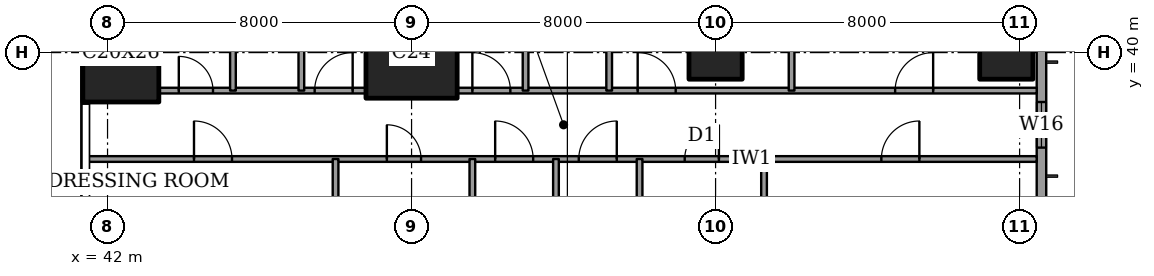
"""IFC4 building model, lengths in metres.
Left out: names, types, materials, properties, quantities, classifications, styles, units other than length and angle.
Written with IfcOpenShell. Run it as: python <this file> out.ifc"""

import sys

from ifc_helpers import new_model, si_unit, direction, frame, frame_2d, origin, origin_2d, place, context, subcontext, project, spatial, rectangle, extrude, element, fill, save


model = new_model("IFC4")
c1 = context("Model", 3, precision=1e-05, world=origin(), true_north=direction((0.0, 1.0)))
c2 = subcontext(c1, "Body", "Model", "MODEL_VIEW")
j1 = project(units=[si_unit("LENGTHUNIT", "METRE"), si_unit("PLANEANGLEUNIT", "RADIAN")], contexts=[c1])
p1 = place(None, origin())
s1 = spatial("IfcSite", under=j1, at=p1, CompositionType="ELEMENT")
p2 = place(p1, origin())
s2 = spatial("IfcBuilding", under=s1, at=p2, CompositionType="ELEMENT")
p3 = place(p2, frame((0.0, 0.0, 282.6)))
s3 = spatial("IfcBuildingStorey", under=s2, at=p3, CompositionType="ELEMENT", Elevation=282.6)
p4 = place(p3, frame((42.35, 40.0, 0.0), z_axis=(0.0, 0.0, 1.0), x_axis=(1.0, 0.0, 0.0)))
e1 = element("IfcColumn", 1, at=p4, inside=s3, PredefinedType="COLUMN", context=c2, shape_type="SweptSolid", body=[
    extrude(rectangle(XDim=2.0, YDim=2.6, at=origin_2d()), origin(), (0.0, 0.0, 1.0), 4.5),
])
p5 = place(p3, frame((50.0, 40.0, 0.0), z_axis=(0.0, 0.0, 1.0), x_axis=(1.0, 0.0, 0.0)))
e2 = element("IfcColumn", 2, at=p5, inside=s3, PredefinedType="COLUMN", context=c2, shape_type="SweptSolid", body=[
    extrude(rectangle(XDim=2.4, YDim=2.4, at=origin_2d()), origin(), (0.0, 0.0, 1.0), 4.5),
])
for number, where, z_axis, x_axis in (
    (3, (58.0, 40.0, 0.0), (0.0, 0.0, 1.0), (1.0, 0.0, 0.0)),
    (4, (65.65, 40.0, 0.0), (0.0, 0.0, 1.0), (1.0, 0.0, 0.0)),
):
    element("IfcColumn", number, at=place(p3, frame(where, z_axis=z_axis, x_axis=x_axis)), inside=s3, PredefinedType="COLUMN", context=c2, shape_type="SweptSolid", body=[
        extrude(rectangle(XDim=1.4, YDim=1.4, at=origin_2d()), origin(), (0.0, 0.0, 1.0), 4.5),
    ])
p6 = place(p3, frame((66.575, 3.175, 0.0), z_axis=(0.0, 0.0, 1.0), x_axis=(0.0, 1.0, 0.0)))
e5 = element("IfcWall", 5, at=p6, inside=s3, PredefinedType="SOLIDWALL", context=c2, shape_type="SweptSolid", body=[
    extrude(rectangle(XDim=41.65, YDim=0.25, at=frame_2d((20.825, 0.0))), origin(), (0.0, 0.0, 1.0), 4.5),
])
p7 = place(p6, frame((1.775, 0.0, 0.6)))
e6 = element("IfcOpeningElement", 6, at=p7, cuts=e5, PredefinedType="OPENING", context=c2, shape_type="SweptSolid", body=[
    extrude(rectangle(XDim=2.4, YDim=2.8, at=frame_2d((1.2, 1.4))), frame((0.0, 0.135, 0.0), z_axis=(0.0, -1.0, 0.0), x_axis=(1.0, 0.0, 0.0)), (0.0, 0.0, 1.0), 0.27),
])
p8 = place(p6, frame((6.225, 0.0, 0.6)))
e7 = element("IfcOpeningElement", 7, at=p8, cuts=e5, PredefinedType="OPENING", context=c2, shape_type="SweptSolid", body=[
    extrude(rectangle(XDim=1.2, YDim=2.8, at=frame_2d((0.6, 1.4))), frame((0.0, 0.135, 0.0), z_axis=(0.0, -1.0, 0.0), x_axis=(1.0, 0.0, 0.0)), (0.0, 0.0, 1.0), 0.27),
])
p9 = place(p6, frame((9.625, 0.0, 0.6)))
e8 = element("IfcOpeningElement", 8, at=p9, cuts=e5, PredefinedType="OPENING", context=c2, shape_type="SweptSolid", body=[
    extrude(rectangle(XDim=2.4, YDim=2.8, at=frame_2d((1.2, 1.4))), frame((0.0, 0.135, 0.0), z_axis=(0.0, -1.0, 0.0), x_axis=(1.0, 0.0, 0.0)), (0.0, 0.0, 1.0), 0.27),
])
p10 = place(p6, frame((14.525, 0.0, 0.6)))
e9 = element("IfcOpeningElement", 9, at=p10, cuts=e5, PredefinedType="OPENING", context=c2, shape_type="SweptSolid", body=[
    extrude(rectangle(XDim=2.4, YDim=2.8, at=frame_2d((1.2, 1.4))), frame((0.0, 0.135, 0.0), z_axis=(0.0, -1.0, 0.0), x_axis=(1.0, 0.0, 0.0)), (0.0, 0.0, 1.0), 0.27),
])
p11 = place(p6, frame((17.725, 0.0, 0.6)))
e10 = element("IfcOpeningElement", 10, at=p11, cuts=e5, PredefinedType="OPENING", context=c2, shape_type="SweptSolid", body=[
    extrude(rectangle(XDim=2.4, YDim=2.8, at=frame_2d((1.2, 1.4))), frame((0.0, 0.135, 0.0), z_axis=(0.0, -1.0, 0.0), x_axis=(1.0, 0.0, 0.0)), (0.0, 0.0, 1.0), 0.27),
])
p12 = place(p6, frame((21.525, 0.0, 0.6)))
e11 = element("IfcOpeningElement", 11, at=p12, cuts=e5, PredefinedType="OPENING", context=c2, shape_type="SweptSolid", body=[
    extrude(rectangle(XDim=2.4, YDim=2.8, at=frame_2d((1.2, 1.4))), frame((0.0, 0.135, 0.0), z_axis=(0.0, -1.0, 0.0), x_axis=(1.0, 0.0, 0.0)), (0.0, 0.0, 1.0), 0.27),
])
p13 = place(p6, frame((24.725, 0.0, 0.6)))
e12 = element("IfcOpeningElement", 12, at=p13, cuts=e5, PredefinedType="OPENING", context=c2, shape_type="SweptSolid", body=[
    extrude(rectangle(XDim=2.4, YDim=2.8, at=frame_2d((1.2, 1.4))), frame((0.0, 0.135, 0.0), z_axis=(0.0, -1.0, 0.0), x_axis=(1.0, 0.0, 0.0)), (0.0, 0.0, 1.0), 0.27),
])
p14 = place(p6, frame((29.725, 0.0, 0.6)))
e13 = element("IfcOpeningElement", 13, at=p14, cuts=e5, PredefinedType="OPENING", context=c2, shape_type="SweptSolid", body=[
    extrude(rectangle(XDim=2.4, YDim=2.8, at=frame_2d((1.2, 1.4))), frame((0.0, 0.135, 0.0), z_axis=(0.0, -1.0, 0.0), x_axis=(1.0, 0.0, 0.0)), (0.0, 0.0, 1.0), 0.27),
])
p15 = place(p6, frame((34.325, 0.0, 0.6)))
e14 = element("IfcOpeningElement", 14, at=p15, cuts=e5, PredefinedType="OPENING", context=c2, shape_type="SweptSolid", body=[
    extrude(rectangle(XDim=1.2, YDim=2.8, at=frame_2d((0.6, 1.4))), frame((0.0, 0.135, 0.0), z_axis=(0.0, -1.0, 0.0), x_axis=(1.0, 0.0, 0.0)), (0.0, 0.0, 1.0), 0.27),
])
p16 = place(p6, frame((37.475, 0.0, 0.6)))
e15 = element("IfcOpeningElement", 15, at=p16, cuts=e5, PredefinedType="OPENING", context=c2, shape_type="SweptSolid", body=[
    extrude(rectangle(XDim=2.4, YDim=2.8, at=frame_2d((1.2, 1.4))), frame((0.0, 0.135, 0.0), z_axis=(0.0, -1.0, 0.0), x_axis=(1.0, 0.0, 0.0)), (0.0, 0.0, 1.0), 0.27),
])
p17 = place(p3, frame((41.439, 37.2, 0.0), z_axis=(0.0, 0.0, 1.0), x_axis=(1.0, 0.0, 0.0)))
e16 = element("IfcWall", 16, at=p17, inside=s3, PredefinedType="PARTITIONING", context=c2, shape_type="SweptSolid", body=[
    extrude(rectangle(XDim=25.011, YDim=0.15, at=frame_2d((12.505, 0.0))), origin(), (0.0, 0.0, 1.0), 4.25),
])
p18 = place(p17, frame((10.761, 0.0, 0.0)))
e17 = element("IfcOpeningElement", 17, at=p18, cuts=e16, PredefinedType="OPENING", context=c2, shape_type="SweptSolid", body=[
    extrude(rectangle(XDim=1.0, YDim=2.1, at=frame_2d((0.5, 1.05))), frame((0.0, 0.085, 0.0), z_axis=(0.0, -1.0, 0.0), x_axis=(1.0, 0.0, 0.0)), (0.0, 0.0, 1.0), 0.17),
])
p19 = place(p17, frame((20.924, 0.0, 0.0)))
e18 = element("IfcOpeningElement", 18, at=p19, cuts=e16, PredefinedType="OPENING", context=c2, shape_type="SweptSolid", body=[
    extrude(rectangle(XDim=1.0, YDim=2.1, at=frame_2d((0.5, 1.05))), frame((0.0, 0.085, 0.0), z_axis=(0.0, -1.0, 0.0), x_axis=(1.0, 0.0, 0.0)), (0.0, 0.0, 1.0), 0.17),
])
p20 = place(p17, frame((15.749, 0.0, 0.0)))
e19 = element("IfcOpeningElement", 19, at=p20, cuts=e16, PredefinedType="OPENING", context=c2, shape_type="SweptSolid", body=[
    extrude(rectangle(XDim=0.9, YDim=2.1, at=frame_2d((0.45, 1.05))), frame((0.0, 0.085, 0.0), z_axis=(0.0, -1.0, 0.0), x_axis=(1.0, 0.0, 0.0)), (0.0, 0.0, 1.0), 0.17),
])
p21 = place(p17, frame((12.961, 0.0, 0.0)))
e20 = element("IfcOpeningElement", 20, at=p21, cuts=e16, PredefinedType="OPENING", context=c2, shape_type="SweptSolid", body=[
    extrude(rectangle(XDim=1.0, YDim=2.1, at=frame_2d((0.5, 1.05))), frame((0.0, 0.085, 0.0), z_axis=(0.0, -1.0, 0.0), x_axis=(1.0, 0.0, 0.0)), (0.0, 0.0, 1.0), 0.17),
])
p22 = place(p17, frame((7.911, 0.0, 0.0)))
e21 = element("IfcOpeningElement", 21, at=p22, cuts=e16, PredefinedType="OPENING", context=c2, shape_type="SweptSolid", body=[
    extrude(rectangle(XDim=0.9, YDim=2.1, at=frame_2d((0.45, 1.05))), frame((0.0, 0.085, 0.0), z_axis=(0.0, -1.0, 0.0), x_axis=(1.0, 0.0, 0.0)), (0.0, 0.0, 1.0), 0.17),
])
p23 = place(p17, frame((2.836, 0.0, 0.0)))
e22 = element("IfcOpeningElement", 22, at=p23, cuts=e16, PredefinedType="OPENING", context=c2, shape_type="SweptSolid", body=[
    extrude(rectangle(XDim=1.0, YDim=2.1, at=frame_2d((0.5, 1.05))), frame((0.0, 0.085, 0.0), z_axis=(0.0, -1.0, 0.0), x_axis=(1.0, 0.0, 0.0)), (0.0, 0.0, 1.0), 0.17),
])
p24 = place(p3, frame((43.35, 39.0, 0.0), z_axis=(0.0, 0.0, 1.0), x_axis=(1.0, 0.0, 0.0)))
e23 = element("IfcWall", 23, at=p24, inside=s3, PredefinedType="PARTITIONING", context=c2, shape_type="SweptSolid", body=[
    extrude(rectangle(XDim=5.45, YDim=0.15, at=frame_2d((2.725, 0.0))), origin(), (0.0, 0.0, 1.0), 4.25),
])
p25 = place(p24, frame((4.1, 0.0, 0.0)))
e24 = element("IfcOpeningElement", 24, at=p25, cuts=e23, PredefinedType="OPENING", context=c2, shape_type="SweptSolid", body=[
    extrude(rectangle(XDim=1.0, YDim=2.1, at=frame_2d((0.5, 1.05))), frame((0.0, 0.085, 0.0), z_axis=(0.0, -1.0, 0.0), x_axis=(1.0, 0.0, 0.0)), (0.0, 0.0, 1.0), 0.17),
])
p26 = place(p24, frame((0.525, 0.0, 0.0)))
e25 = element("IfcOpeningElement", 25, at=p26, cuts=e23, PredefinedType="OPENING", context=c2, shape_type="SweptSolid", body=[
    extrude(rectangle(XDim=0.9, YDim=2.1, at=frame_2d((0.45, 1.05))), frame((0.0, 0.085, 0.0), z_axis=(0.0, -1.0, 0.0), x_axis=(1.0, 0.0, 0.0)), (0.0, 0.0, 1.0), 0.17),
])
p27 = place(p3, frame((51.2, 39.0, 0.0), z_axis=(0.0, 0.0, 1.0), x_axis=(1.0, 0.0, 0.0)))
e26 = element("IfcWall", 26, at=p27, inside=s3, PredefinedType="PARTITIONING", context=c2, shape_type="SweptSolid", body=[
    extrude(rectangle(XDim=15.25, YDim=0.15, at=frame_2d((7.625, 0.0))), origin(), (0.0, 0.0, 1.0), 4.25),
])
p28 = place(p27, frame((11.525, 0.0, 0.0)))
e27 = element("IfcOpeningElement", 27, at=p28, cuts=e26, PredefinedType="OPENING", context=c2, shape_type="SweptSolid", body=[
    extrude(rectangle(XDim=1.0, YDim=2.1, at=frame_2d((0.5, 1.05))), frame((0.0, 0.085, 0.0), z_axis=(0.0, -1.0, 0.0), x_axis=(1.0, 0.0, 0.0)), (0.0, 0.0, 1.0), 0.17),
])
p29 = place(p27, frame((4.75, 0.0, 0.0)))
e28 = element("IfcOpeningElement", 28, at=p29, cuts=e26, PredefinedType="OPENING", context=c2, shape_type="SweptSolid", body=[
    extrude(rectangle(XDim=1.0, YDim=2.1, at=frame_2d((0.5, 1.05))), frame((0.0, 0.085, 0.0), z_axis=(0.0, -1.0, 0.0), x_axis=(1.0, 0.0, 0.0)), (0.0, 0.0, 1.0), 0.17),
])
p30 = place(p27, frame((0.4, 0.0, 0.0)))
e29 = element("IfcOpeningElement", 29, at=p30, cuts=e26, PredefinedType="OPENING", context=c2, shape_type="SweptSolid", body=[
    extrude(rectangle(XDim=1.0, YDim=2.1, at=frame_2d((0.5, 1.05))), frame((0.0, 0.085, 0.0), z_axis=(0.0, -1.0, 0.0), x_axis=(1.0, 0.0, 0.0)), (0.0, 0.0, 1.0), 0.17),
])
p31 = place(p3, frame((45.3, 39.0, 0.0), z_axis=(0.0, 0.0, 1.0), x_axis=(0.0, 1.0, 0.0)))
e30 = element("IfcWall", 30, at=p31, inside=s3, PredefinedType="PARTITIONING", context=c2, shape_type="SweptSolid", body=[
    extrude(rectangle(XDim=9.561, YDim=0.15, at=frame_2d((4.781, 0.0))), origin(), (0.0, 0.0, 1.0), 4.25),
])
p32 = place(p3, frame((47.1, 39.0, 0.0), z_axis=(0.0, 0.0, 1.0), x_axis=(0.0, 1.0, 0.0)))
e31 = element("IfcWall", 31, at=p32, inside=s3, PredefinedType="PARTITIONING", context=c2, shape_type="SweptSolid", body=[
    extrude(rectangle(XDim=4.7, YDim=0.15, at=frame_2d((2.35, 0.0))), origin(), (0.0, 0.0, 1.0), 4.25),
])
p33 = place(p32, frame((1.9, 0.0, 0.0)))
e32 = element("IfcOpeningElement", 32, at=p33, cuts=e31, PredefinedType="OPENING", context=c2, shape_type="SweptSolid", body=[
    extrude(rectangle(XDim=0.9, YDim=2.1, at=frame_2d((0.45, 1.05))), frame((0.0, 0.085, 0.0), z_axis=(0.0, -1.0, 0.0), x_axis=(1.0, 0.0, 0.0)), (0.0, 0.0, 1.0), 0.17),
])
p34 = place(p3, frame((48.0, 28.0, 0.0), z_axis=(0.0, 0.0, 1.0), x_axis=(0.0, 1.0, 0.0)))
e33 = element("IfcWall", 33, at=p34, inside=s3, PredefinedType="PARTITIONING", context=c2, shape_type="SweptSolid", body=[
    extrude(rectangle(XDim=9.2, YDim=0.15, at=frame_2d((4.6, 0.0))), origin(), (0.0, 0.0, 1.0), 4.25),
])
p35 = place(p34, frame((0.5, 0.0, 0.0)))
e34 = element("IfcOpeningElement", 34, at=p35, cuts=e33, PredefinedType="OPENING", context=c2, shape_type="SweptSolid", body=[
    extrude(rectangle(XDim=1.0, YDim=2.1, at=frame_2d((0.5, 1.05))), frame((0.0, 0.085, 0.0), z_axis=(0.0, -1.0, 0.0), x_axis=(1.0, 0.0, 0.0)), (0.0, 0.0, 1.0), 0.17),
])
p36 = place(p3, frame((51.6, 30.0, 0.0), z_axis=(0.0, 0.0, 1.0), x_axis=(0.0, 1.0, 0.0)))
e35 = element("IfcWall", 35, at=p36, inside=s3, PredefinedType="PARTITIONING", context=c2, shape_type="SweptSolid", body=[
    extrude(rectangle(XDim=7.2, YDim=0.15, at=frame_2d((3.6, 0.0))), origin(), (0.0, 0.0, 1.0), 4.25),
])
p37 = place(p3, frame((53.0, 39.0, 0.0), z_axis=(0.0, 0.0, 1.0), x_axis=(0.0, 1.0, 0.0)))
e36 = element("IfcWall", 36, at=p37, inside=s3, PredefinedType="PARTITIONING", context=c2, shape_type="SweptSolid", body=[
    extrude(rectangle(XDim=9.561, YDim=0.15, at=frame_2d((4.781, 0.0))), origin(), (0.0, 0.0, 1.0), 4.25),
])
p38 = place(p3, frame((53.8, 30.0, 0.0), z_axis=(0.0, 0.0, 1.0), x_axis=(0.0, 1.0, 0.0)))
e37 = element("IfcWall", 37, at=p38, inside=s3, PredefinedType="PARTITIONING", context=c2, shape_type="SweptSolid", body=[
    extrude(rectangle(XDim=7.2, YDim=0.15, at=frame_2d((3.6, 0.0))), origin(), (0.0, 0.0, 1.0), 4.25),
])
p39 = place(p3, frame((55.2, 39.0, 0.0), z_axis=(0.0, 0.0, 1.0), x_axis=(0.0, 1.0, 0.0)))
e38 = element("IfcWall", 38, at=p39, inside=s3, PredefinedType="PARTITIONING", context=c2, shape_type="SweptSolid", body=[
    extrude(rectangle(XDim=3.4, YDim=0.15, at=frame_2d((1.7, 0.0))), origin(), (0.0, 0.0, 1.0), 4.25),
])
p40 = place(p39, frame((1.25, 0.0, 0.0)))
e39 = element("IfcOpeningElement", 39, at=p40, cuts=e38, PredefinedType="OPENING", context=c2, shape_type="SweptSolid", body=[
    extrude(rectangle(XDim=0.9, YDim=2.1, at=frame_2d((0.45, 1.05))), frame((0.0, 0.085, 0.0), z_axis=(0.0, -1.0, 0.0), x_axis=(1.0, 0.0, 0.0)), (0.0, 0.0, 1.0), 0.17),
])
p41 = place(p3, frame((56.0, 28.0, 0.0), z_axis=(0.0, 0.0, 1.0), x_axis=(0.0, 1.0, 0.0)))
e40 = element("IfcWall", 40, at=p41, inside=s3, PredefinedType="PARTITIONING", context=c2, shape_type="SweptSolid", body=[
    extrude(rectangle(XDim=9.2, YDim=0.15, at=frame_2d((4.6, 0.0))), origin(), (0.0, 0.0, 1.0), 4.25),
])
p42 = place(p41, frame((0.5, 0.0, 0.0)))
e41 = element("IfcOpeningElement", 41, at=p42, cuts=e40, PredefinedType="OPENING", context=c2, shape_type="SweptSolid", body=[
    extrude(rectangle(XDim=1.0, YDim=2.1, at=frame_2d((0.5, 1.05))), frame((0.0, 0.085, 0.0), z_axis=(0.0, -1.0, 0.0), x_axis=(1.0, 0.0, 0.0)), (0.0, 0.0, 1.0), 0.17),
])
p43 = place(p3, frame((59.275, 33.2, 0.0), z_axis=(0.0, 0.0, 1.0), x_axis=(0.0, 1.0, 0.0)))
e42 = element("IfcWall", 42, at=p43, inside=s3, PredefinedType="PARTITIONING", context=c2, shape_type="SweptSolid", body=[
    extrude(rectangle(XDim=4.0, YDim=0.15, at=frame_2d((2.0, 0.0))), origin(), (0.0, 0.0, 1.0), 4.25),
])
p44 = place(p3, frame((60.0, 39.0, 0.0), z_axis=(0.0, 0.0, 1.0), x_axis=(0.0, 1.0, 0.0)))
e43 = element("IfcWall", 43, at=p44, inside=s3, PredefinedType="PARTITIONING", context=c2, shape_type="SweptSolid", body=[
    extrude(rectangle(XDim=9.561, YDim=0.15, at=frame_2d((4.781, 0.0))), origin(), (0.0, 0.0, 1.0), 4.25),
])
p45 = place(p15, origin())
e44 = element("IfcWindow", 44, at=p45, inside=s3, PartitioningType="SINGLE_PANEL", PredefinedType="WINDOW", context=c2, shape_type="SweptSolid", body=[
    extrude(rectangle(XDim=1.2, YDim=2.8, at=frame_2d((0.6, 1.4))), frame((0.0, 0.03, 0.0), z_axis=(0.0, -1.0, 0.0), x_axis=(1.0, 0.0, 0.0)), (0.0, 0.0, 1.0), 0.06),
])
fill(e14, e44)
p46 = place(p28, origin())
e45 = element("IfcDoor", 45, at=p46, inside=s3, OperationType="SINGLE_SWING_LEFT", PredefinedType="DOOR", context=c2, shape_type="SweptSolid", body=[
    extrude(rectangle(XDim=1.0, YDim=2.1, at=frame_2d((0.5, 1.05))), frame((0.0, 0.025, 0.0), z_axis=(0.0, -1.0, 0.0), x_axis=(1.0, 0.0, 0.0)), (0.0, 0.0, 1.0), 0.05),
])
fill(e27, e45)
p47 = place(p29, origin())
e46 = element("IfcDoor", 46, at=p47, inside=s3, OperationType="SINGLE_SWING_RIGHT", PredefinedType="DOOR", context=c2, shape_type="SweptSolid", body=[
    extrude(rectangle(XDim=1.0, YDim=2.1, at=frame_2d((0.5, 1.05))), frame((0.0, 0.025, 0.0), z_axis=(0.0, -1.0, 0.0), x_axis=(1.0, 0.0, 0.0)), (0.0, 0.0, 1.0), 0.05),
])
fill(e28, e46)
p48 = place(p30, origin())
e47 = element("IfcDoor", 47, at=p48, inside=s3, OperationType="SINGLE_SWING_RIGHT", PredefinedType="DOOR", context=c2, shape_type="SweptSolid", body=[
    extrude(rectangle(XDim=1.0, YDim=2.1, at=frame_2d((0.5, 1.05))), frame((0.0, 0.025, 0.0), z_axis=(0.0, -1.0, 0.0), x_axis=(1.0, 0.0, 0.0)), (0.0, 0.0, 1.0), 0.05),
])
fill(e29, e47)
p49 = place(p25, origin())
e48 = element("IfcDoor", 48, at=p49, inside=s3, OperationType="SINGLE_SWING_LEFT", PredefinedType="DOOR", context=c2, shape_type="SweptSolid", body=[
    extrude(rectangle(XDim=1.0, YDim=2.1, at=frame_2d((0.5, 1.05))), frame((0.0, 0.025, 0.0), z_axis=(0.0, -1.0, 0.0), x_axis=(1.0, 0.0, 0.0)), (0.0, 0.0, 1.0), 0.05),
])
fill(e24, e48)
p50 = place(p26, origin())
e49 = element("IfcDoor", 49, at=p50, inside=s3, OperationType="SINGLE_SWING_RIGHT", PredefinedType="DOOR", context=c2, shape_type="SweptSolid", body=[
    extrude(rectangle(XDim=0.9, YDim=2.1, at=frame_2d((0.45, 1.05))), frame((0.0, 0.025, 0.0), z_axis=(0.0, -1.0, 0.0), x_axis=(1.0, 0.0, 0.0)), (0.0, 0.0, 1.0), 0.05),
])
fill(e25, e49)
p51 = place(p18, origin())
e50 = element("IfcDoor", 50, at=p51, inside=s3, OperationType="SINGLE_SWING_RIGHT", PredefinedType="DOOR", context=c2, shape_type="SweptSolid", body=[
    extrude(rectangle(XDim=1.0, YDim=2.1, at=frame_2d((0.5, 1.05))), frame((0.0, 0.025, 0.0), z_axis=(0.0, -1.0, 0.0), x_axis=(1.0, 0.0, 0.0)), (0.0, 0.0, 1.0), 0.05),
])
fill(e17, e50)
p52 = place(p19, origin())
e51 = element("IfcDoor", 51, at=p52, inside=s3, OperationType="SINGLE_SWING_LEFT", PredefinedType="DOOR", context=c2, shape_type="SweptSolid", body=[
    extrude(rectangle(XDim=1.0, YDim=2.1, at=frame_2d((0.5, 1.05))), frame((0.0, 0.025, 0.0), z_axis=(0.0, -1.0, 0.0), x_axis=(1.0, 0.0, 0.0)), (0.0, 0.0, 1.0), 0.05),
])
fill(e18, e51)
p53 = place(p20, origin())
e52 = element("IfcDoor", 52, at=p53, inside=s3, OperationType="SINGLE_SWING_LEFT", PredefinedType="DOOR", context=c2, shape_type="SweptSolid", body=[
    extrude(rectangle(XDim=0.9, YDim=2.1, at=frame_2d((0.45, 1.05))), frame((0.0, 0.025, 0.0), z_axis=(0.0, -1.0, 0.0), x_axis=(1.0, 0.0, 0.0)), (0.0, 0.0, 1.0), 0.05),
])
fill(e19, e52)
p54 = place(p21, origin())
e53 = element("IfcDoor", 53, at=p54, inside=s3, OperationType="SINGLE_SWING_LEFT", PredefinedType="DOOR", context=c2, shape_type="SweptSolid", body=[
    extrude(rectangle(XDim=1.0, YDim=2.1, at=frame_2d((0.5, 1.05))), frame((0.0, 0.025, 0.0), z_axis=(0.0, -1.0, 0.0), x_axis=(1.0, 0.0, 0.0)), (0.0, 0.0, 1.0), 0.05),
])
fill(e20, e53)
p55 = place(p22, origin())
e54 = element("IfcDoor", 54, at=p55, inside=s3, OperationType="SINGLE_SWING_RIGHT", PredefinedType="DOOR", context=c2, shape_type="SweptSolid", body=[
    extrude(rectangle(XDim=0.9, YDim=2.1, at=frame_2d((0.45, 1.05))), frame((0.0, 0.025, 0.0), z_axis=(0.0, -1.0, 0.0), x_axis=(1.0, 0.0, 0.0)), (0.0, 0.0, 1.0), 0.05),
])
fill(e21, e54)
p56 = place(p23, origin())
e55 = element("IfcDoor", 55, at=p56, inside=s3, OperationType="SINGLE_SWING_RIGHT", PredefinedType="DOOR", context=c2, shape_type="SweptSolid", body=[
    extrude(rectangle(XDim=1.0, YDim=2.1, at=frame_2d((0.5, 1.05))), frame((0.0, 0.025, 0.0), z_axis=(0.0, -1.0, 0.0), x_axis=(1.0, 0.0, 0.0)), (0.0, 0.0, 1.0), 0.05),
])
fill(e22, e55)
save(model, sys.argv[1])
